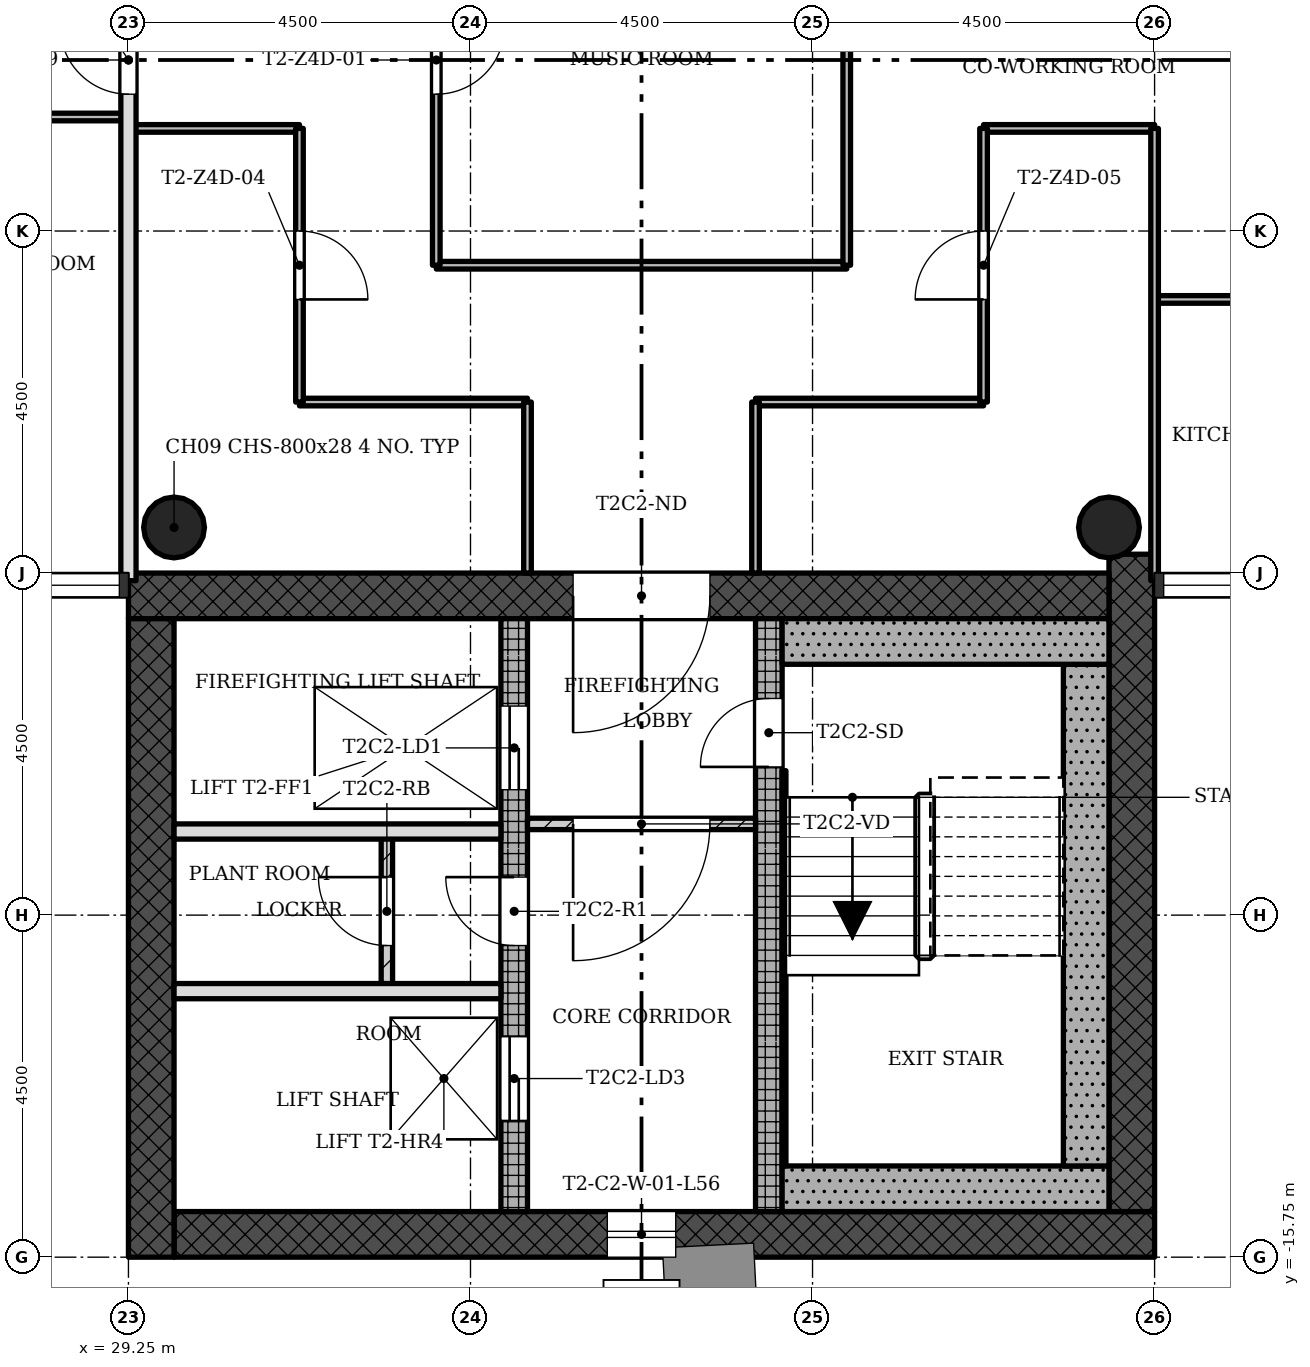
"""IFC4 building model, lengths in metres.
Left out: names, types, materials, properties, quantities, classifications, styles, units other than length and angle.
Written with IfcOpenShell. Run it as: python <this file> out.ifc"""

import sys

from ifc_helpers import new_model, si_unit, direction, frame, frame_2d, origin, origin_2d, place, context, subcontext, project, spatial, rectangle, hollow_circle, extrude, element, fill, save


model = new_model("IFC4")
c1 = context("Model", 3, precision=1e-05, world=origin(), true_north=direction((0.0, 1.0)))
c2 = subcontext(c1, "Body", "Model", "MODEL_VIEW")
j1 = project(units=[si_unit("LENGTHUNIT", "METRE"), si_unit("PLANEANGLEUNIT", "RADIAN")], contexts=[c1])
p1 = place(None, origin())
s1 = spatial("IfcSite", under=j1, at=p1, CompositionType="ELEMENT")
p2 = place(p1, origin())
s2 = spatial("IfcBuilding", under=s1, at=p2, CompositionType="ELEMENT")
p3 = place(p2, frame((0.0, 0.0, 202.8)))
s3 = spatial("IfcBuildingStorey", under=s2, at=p3, CompositionType="ELEMENT", Elevation=202.8)
p4 = place(p3, frame((29.85, -15.45, 0.0), z_axis=(0.0, 0.0, 1.0), x_axis=(1.0, 0.0, 0.0)))
e1 = element("IfcWall", 1, at=p4, inside=s3, PredefinedType="SHEAR", context=c2, shape_type="SweptSolid", body=[
    extrude(rectangle(XDim=12.9, YDim=0.6, at=frame_2d((6.45, 0.0))), origin(), (0.0, 0.0, 1.0), 3.4),
])
p5 = place(p4, frame((5.7, 0.0, 0.45)))
e2 = element("IfcOpeningElement", 2, at=p5, cuts=e1, PredefinedType="OPENING", context=c2, shape_type="SweptSolid", body=[
    extrude(rectangle(XDim=0.9, YDim=2.4, at=frame_2d((0.45, 1.2))), frame((0.0, 0.31, 0.0), z_axis=(0.0, -1.0, 0.0), x_axis=(1.0, 0.0, 0.0)), (0.0, 0.0, 1.0), 0.62),
])
p6 = place(p3, frame((42.45, -15.15, 0.0), z_axis=(0.0, 0.0, 1.0), x_axis=(0.0, 1.0, 0.0)))
e3 = element("IfcWall", 3, at=p6, inside=s3, PredefinedType="SHEAR", context=c2, shape_type="SweptSolid", body=[
    extrude(rectangle(XDim=8.648, YDim=0.6, at=frame_2d((4.324, 0.0))), origin(), (0.0, 0.0, 1.0), 3.4),
])
p7 = place(p3, frame((42.15, -7.05, 0.0), z_axis=(0.0, 0.0, 1.0), x_axis=(-1.0, 0.0, 0.0)))
e4 = element("IfcWall", 4, at=p7, inside=s3, PredefinedType="SHEAR", context=c2, shape_type="SweptSolid", body=[
    extrude(rectangle(XDim=12.9, YDim=0.6, at=frame_2d((6.45, 0.0))), origin(), (0.0, 0.0, 1.0), 3.4),
])
p8 = place(p7, frame((5.25, 0.0, 0.0)))
e5 = element("IfcOpeningElement", 5, at=p8, cuts=e4, PredefinedType="OPENING", context=c2, shape_type="SweptSolid", body=[
    extrude(rectangle(XDim=1.8, YDim=2.1, at=frame_2d((0.9, 1.05))), frame((0.0, 0.31, 0.0), z_axis=(0.0, -1.0, 0.0), x_axis=(1.0, 0.0, 0.0)), (0.0, 0.0, 1.0), 0.62),
])
p9 = place(p3, frame((29.55, -7.35, 0.0), z_axis=(0.0, 0.0, 1.0), x_axis=(0.0, -1.0, 0.0)))
e6 = element("IfcWall", 6, at=p9, inside=s3, PredefinedType="SHEAR", context=c2, shape_type="SweptSolid", body=[
    extrude(rectangle(XDim=8.4, YDim=0.6, at=frame_2d((4.2, 0.0))), origin(), (0.0, 0.0, 1.0), 3.4),
])
p10 = place(p3, frame((34.325, -15.15, 0.0), z_axis=(0.0, 0.0, 1.0), x_axis=(0.0, 1.0, 0.0)))
e7 = element("IfcWall", 7, at=p10, inside=s3, PredefinedType="SHEAR", context=c2, shape_type="SweptSolid", body=[
    extrude(rectangle(XDim=7.8, YDim=0.35, at=frame_2d((3.9, 0.0))), origin(), (0.0, 0.0, 1.0), 3.4),
])
p11 = place(p10, frame((5.55, 0.0, 0.0)))
e8 = element("IfcOpeningElement", 8, at=p11, cuts=e7, PredefinedType="OPENING", context=c2, shape_type="SweptSolid", body=[
    extrude(rectangle(XDim=1.1, YDim=2.1, at=frame_2d((0.55, 1.05))), frame((0.0, 0.185, 0.0), z_axis=(0.0, -1.0, 0.0), x_axis=(1.0, 0.0, 0.0)), (0.0, 0.0, 1.0), 0.37),
])
p12 = place(p10, frame((1.2, 0.0, 0.0)))
e9 = element("IfcOpeningElement", 9, at=p12, cuts=e7, PredefinedType="OPENING", context=c2, shape_type="SweptSolid", body=[
    extrude(rectangle(XDim=1.1, YDim=2.1, at=frame_2d((0.55, 1.05))), frame((0.0, 0.185, 0.0), z_axis=(0.0, -1.0, 0.0), x_axis=(1.0, 0.0, 0.0)), (0.0, 0.0, 1.0), 0.37),
])
p13 = place(p10, frame((3.5, 0.0, 0.0)))
e10 = element("IfcOpeningElement", 10, at=p13, cuts=e7, PredefinedType="OPENING", context=c2, shape_type="SweptSolid", body=[
    extrude(rectangle(XDim=0.9, YDim=2.1, at=frame_2d((0.45, 1.05))), frame((0.0, 0.185, 0.0), z_axis=(0.0, -1.0, 0.0), x_axis=(1.0, 0.0, 0.0)), (0.0, 0.0, 1.0), 0.37),
])
p14 = place(p3, frame((37.675, -15.15, 0.0), z_axis=(0.0, 0.0, 1.0), x_axis=(0.0, 1.0, 0.0)))
e11 = element("IfcWall", 11, at=p14, inside=s3, PredefinedType="SHEAR", context=c2, shape_type="SweptSolid", body=[
    extrude(rectangle(XDim=7.8, YDim=0.35, at=frame_2d((3.9, 0.0))), origin(), (0.0, 0.0, 1.0), 3.4),
])
p15 = place(p14, frame((5.85, 0.0, 0.0)))
e12 = element("IfcOpeningElement", 12, at=p15, cuts=e11, PredefinedType="OPENING", context=c2, shape_type="SweptSolid", body=[
    extrude(rectangle(XDim=0.9, YDim=2.1, at=frame_2d((0.45, 1.05))), frame((0.0, 0.185, 0.0), z_axis=(0.0, -1.0, 0.0), x_axis=(1.0, 0.0, 0.0)), (0.0, 0.0, 1.0), 0.37),
])
for number, where, z_axis, x_axis in (
    (13, (42.15, -6.15, 0.0), (0.0, 0.0, 1.0), (1.0, 0.0, 0.0)),
    (14, (29.85, -6.15, 0.0), (0.0, 0.0, 1.0), (1.0, 0.0, 0.0)),
):
    element("IfcColumn", number, at=place(p3, frame(where, z_axis=z_axis, x_axis=x_axis)), inside=s3, PredefinedType="COLUMN", context=c2, shape_type="SweptSolid", body=[
        extrude(hollow_circle(Radius=0.4, WallThickness=0.028, at=origin_2d()), origin(), (0.0, 0.0, 1.0), 3.4),
    ])
p16 = place(p3, frame((34.5, -10.05, 0.0), z_axis=(0.0, 0.0, 1.0), x_axis=(1.0, 0.0, 0.0)))
e15 = element("IfcWall", 15, at=p16, inside=s3, PredefinedType="PARTITIONING", context=c2, shape_type="SweptSolid", body=[
    extrude(rectangle(XDim=3.0, YDim=0.15, at=frame_2d((1.5, 0.0))), origin(), (0.0, 0.0, 1.0), 3.0),
])
p17 = place(p16, frame((0.6, 0.0, 0.0)))
e16 = element("IfcOpeningElement", 16, at=p17, cuts=e15, PredefinedType="OPENING", context=c2, shape_type="SweptSolid", body=[
    extrude(rectangle(XDim=1.8, YDim=2.1, at=frame_2d((0.9, 1.05))), frame((0.0, 0.085, 0.0), z_axis=(0.0, -1.0, 0.0), x_axis=(1.0, 0.0, 0.0)), (0.0, 0.0, 1.0), 0.17),
])
for number, where, z_axis, x_axis in (
    (17, (29.85, -12.25, 0.0), (0.0, 0.0, 1.0), (1.0, 0.0, 0.0)),
    (18, (29.85, -10.15, 0.0), (0.0, 0.0, 1.0), (1.0, 0.0, 0.0)),
):
    element("IfcWall", number, at=place(p3, frame(where, z_axis=z_axis, x_axis=x_axis)), inside=s3, PredefinedType="SOLIDWALL", context=c2, shape_type="SweptSolid", body=[
        extrude(rectangle(XDim=4.3, YDim=0.2, at=frame_2d((2.15, 0.0))), origin(), (0.0, 0.0, 1.0), 3.0),
    ])
p18 = place(p3, frame((32.65, -10.15, 0.0), z_axis=(0.0, 0.0, 1.0), x_axis=(0.0, -1.0, 0.0)))
e19 = element("IfcWall", 19, at=p18, inside=s3, PredefinedType="PARTITIONING", context=c2, shape_type="SweptSolid", body=[
    extrude(rectangle(XDim=2.1, YDim=0.15, at=frame_2d((1.05, 0.0))), origin(), (0.0, 0.0, 1.0), 3.0),
])
p19 = place(p18, frame((0.6, 0.0, 0.0)))
e20 = element("IfcOpeningElement", 20, at=p19, cuts=e19, PredefinedType="OPENING", context=c2, shape_type="SweptSolid", body=[
    extrude(rectangle(XDim=0.9, YDim=2.1, at=frame_2d((0.45, 1.05))), frame((0.0, 0.085, 0.0), z_axis=(0.0, -1.0, 0.0), x_axis=(1.0, 0.0, 0.0)), (0.0, 0.0, 1.0), 0.17),
])
for number, where, z_axis, x_axis in (
    (21, (40.5, -4.5, 0.0), (0.0, 0.0, 1.0), (-1.0, 0.0, 0.0)),
    (22, (34.5, -4.5, 0.0), (0.0, 0.0, 1.0), (-1.0, 0.0, 0.0)),
):
    element("IfcWall", number, at=place(p3, frame(where, z_axis=z_axis, x_axis=x_axis)), inside=s3, PredefinedType="PARTITIONING", context=c2, shape_type="SweptSolid", body=[
        extrude(rectangle(XDim=3.0, YDim=0.1, at=frame_2d((1.5, 0.0))), origin(), (0.0, 0.0, 1.0), 3.0),
    ])
p20 = place(p3, frame((47.25, -3.15, 0.0), z_axis=(0.0, 0.0, 1.0), x_axis=(-1.0, 0.0, 0.0)))
e23 = element("IfcWall", 23, at=p20, inside=s3, PredefinedType="PARTITIONING", context=c2, shape_type="SweptSolid", body=[
    extrude(rectangle(XDim=4.5, YDim=0.1, at=frame_2d((2.25, 0.0))), origin(), (0.0, 0.0, 1.0), 3.0),
])
p21 = place(p20, frame((1.8, 0.0, 0.0)))
e24 = element("IfcOpeningElement", 24, at=p21, cuts=e23, PredefinedType="OPENING", context=c2, shape_type="SweptSolid", body=[
    extrude(rectangle(XDim=0.9, YDim=2.1, at=frame_2d((0.45, 1.05))), frame((0.0, 0.06, 0.0), z_axis=(0.0, -1.0, 0.0), x_axis=(1.0, 0.0, 0.0)), (0.0, 0.0, 1.0), 0.12),
])
p22 = place(p3, frame((38.7, -2.7, 0.0), z_axis=(0.0, 0.0, 1.0), x_axis=(-1.0, 0.0, 0.0)))
e25 = element("IfcWall", 25, at=p22, inside=s3, PredefinedType="PARTITIONING", context=c2, shape_type="SweptSolid", body=[
    extrude(rectangle(XDim=5.4, YDim=0.1, at=frame_2d((2.7, 0.0))), origin(), (0.0, 0.0, 1.0), 3.0),
])
for number, where, z_axis, x_axis in (
    (26, (42.75, -0.9, 0.0), (0.0, 0.0, 1.0), (-1.0, 0.0, 0.0)),
    (27, (31.5, -0.9, 0.0), (0.0, 0.0, 1.0), (-1.0, 0.0, 0.0)),
):
    element("IfcWall", number, at=place(p3, frame(where, z_axis=z_axis, x_axis=x_axis)), inside=s3, PredefinedType="PARTITIONING", context=c2, shape_type="SweptSolid", body=[
        extrude(rectangle(XDim=2.25, YDim=0.1, at=frame_2d((1.125, 0.0))), origin(), (0.0, 0.0, 1.0), 3.0),
    ])
p23 = place(p3, frame((29.25, -0.75, 0.0), z_axis=(0.0, 0.0, 1.0), x_axis=(-1.0, 0.0, 0.0)))
e28 = element("IfcWall", 28, at=p23, inside=s3, PredefinedType="PARTITIONING", context=c2, shape_type="SweptSolid", body=[
    extrude(rectangle(XDim=4.5, YDim=0.1, at=frame_2d((2.25, 0.0))), origin(), (0.0, 0.0, 1.0), 3.0),
])
p24 = place(p23, frame((1.8, 0.0, 0.0)))
e29 = element("IfcOpeningElement", 29, at=p24, cuts=e28, PredefinedType="OPENING", context=c2, shape_type="SweptSolid", body=[
    extrude(rectangle(XDim=0.9, YDim=2.1, at=frame_2d((0.45, 1.05))), frame((0.0, 0.06, 0.0), z_axis=(0.0, -1.0, 0.0), x_axis=(1.0, 0.0, 0.0)), (0.0, 0.0, 1.0), 0.12),
])
p25 = place(p3, frame((42.75, -6.85, 0.0), z_axis=(0.0, 0.0, 1.0), x_axis=(0.0, 1.0, 0.0)))
e30 = element("IfcWall", 30, at=p25, inside=s3, PredefinedType="PARTITIONING", context=c2, shape_type="SweptSolid", body=[
    extrude(rectangle(XDim=5.95, YDim=0.1, at=frame_2d((2.975, 0.0))), origin(), (0.0, 0.0, 1.0), 3.0),
])
p26 = place(p3, frame((40.5, -4.5, 0.0), z_axis=(0.0, 0.0, 1.0), x_axis=(0.0, 1.0, 0.0)))
e31 = element("IfcWall", 31, at=p26, inside=s3, PredefinedType="PARTITIONING", context=c2, shape_type="SweptSolid", body=[
    extrude(rectangle(XDim=3.6, YDim=0.1, at=frame_2d((1.8, 0.0))), origin(), (0.0, 0.0, 1.0), 3.0),
])
p27 = place(p26, frame((1.35, 0.0, 0.0)))
e32 = element("IfcOpeningElement", 32, at=p27, cuts=e31, PredefinedType="OPENING", context=c2, shape_type="SweptSolid", body=[
    extrude(rectangle(XDim=0.9, YDim=2.1, at=frame_2d((0.45, 1.05))), frame((0.0, 0.06, 0.0), z_axis=(0.0, -1.0, 0.0), x_axis=(1.0, 0.0, 0.0)), (0.0, 0.0, 1.0), 0.12),
])
p28 = place(p3, frame((38.7, -2.7, 0.0), z_axis=(0.0, 0.0, 1.0), x_axis=(0.0, 1.0, 0.0)))
e33 = element("IfcWall", 33, at=p28, inside=s3, PredefinedType="PARTITIONING", context=c2, shape_type="SweptSolid", body=[
    extrude(rectangle(XDim=5.4, YDim=0.1, at=frame_2d((2.7, 0.0))), origin(), (0.0, 0.0, 1.0), 3.0),
])
for number, where, z_axis, x_axis in (
    (34, (37.5, -6.75, 0.0), (0.0, 0.0, 1.0), (0.0, 1.0, 0.0)),
    (35, (34.5, -6.75, 0.0), (0.0, 0.0, 1.0), (0.0, 1.0, 0.0)),
):
    element("IfcWall", number, at=place(p3, frame(where, z_axis=z_axis, x_axis=x_axis)), inside=s3, PredefinedType="PARTITIONING", context=c2, shape_type="SweptSolid", body=[
        extrude(rectangle(XDim=2.25, YDim=0.1, at=frame_2d((1.125, 0.0))), origin(), (0.0, 0.0, 1.0), 3.0),
    ])
p29 = place(p3, frame((33.3, -2.7, 0.0), z_axis=(0.0, 0.0, 1.0), x_axis=(0.0, 1.0, 0.0)))
e36 = element("IfcWall", 36, at=p29, inside=s3, PredefinedType="PARTITIONING", context=c2, shape_type="SweptSolid", body=[
    extrude(rectangle(XDim=5.4, YDim=0.1, at=frame_2d((2.7, 0.0))), origin(), (0.0, 0.0, 1.0), 3.0),
])
p30 = place(p29, frame((2.25, 0.0, 0.0)))
e37 = element("IfcOpeningElement", 37, at=p30, cuts=e36, PredefinedType="OPENING", context=c2, shape_type="SweptSolid", body=[
    extrude(rectangle(XDim=0.9, YDim=2.1, at=frame_2d((0.45, 1.05))), frame((0.0, 0.06, 0.0), z_axis=(0.0, -1.0, 0.0), x_axis=(1.0, 0.0, 0.0)), (0.0, 0.0, 1.0), 0.12),
])
p31 = place(p3, frame((31.5, -4.5, 0.0), z_axis=(0.0, 0.0, 1.0), x_axis=(0.0, 1.0, 0.0)))
e38 = element("IfcWall", 38, at=p31, inside=s3, PredefinedType="PARTITIONING", context=c2, shape_type="SweptSolid", body=[
    extrude(rectangle(XDim=3.6, YDim=0.1, at=frame_2d((1.8, 0.0))), origin(), (0.0, 0.0, 1.0), 3.0),
])
p32 = place(p31, frame((1.35, 0.0, 0.0)))
e39 = element("IfcOpeningElement", 39, at=p32, cuts=e38, PredefinedType="OPENING", context=c2, shape_type="SweptSolid", body=[
    extrude(rectangle(XDim=0.9, YDim=2.1, at=frame_2d((0.45, 1.05))), frame((0.0, 0.06, 0.0), z_axis=(0.0, -1.0, 0.0), x_axis=(1.0, 0.0, 0.0)), (0.0, 0.0, 1.0), 0.12),
])
p33 = place(p3, frame((29.25, -6.85, 0.0), z_axis=(0.0, 0.0, 1.0), x_axis=(0.0, 1.0, 0.0)))
e40 = element("IfcWall", 40, at=p33, inside=s3, PredefinedType="SOLIDWALL", context=c2, shape_type="SweptSolid", body=[
    extrude(rectangle(XDim=13.7, YDim=0.2, at=frame_2d((6.85, 0.0))), origin(), (0.0, 0.0, 1.0), 3.0),
])
p34 = place(p33, frame((6.4, 0.0, 0.0)))
e41 = element("IfcOpeningElement", 41, at=p34, cuts=e40, PredefinedType="OPENING", context=c2, shape_type="SweptSolid", body=[
    extrude(rectangle(XDim=0.9, YDim=2.1, at=frame_2d((0.45, 1.05))), frame((0.0, 0.11, 0.0), z_axis=(0.0, -1.0, 0.0), x_axis=(1.0, 0.0, 0.0)), (0.0, 0.0, 1.0), 0.22),
])
p35 = place(p3, frame((37.85, -14.85, 0.0), z_axis=(0.0, 0.0, 1.0), x_axis=(1.0, 0.0, 0.0)))
e42 = element("IfcWall", 42, at=p35, inside=s3, PredefinedType="SHEAR", context=c2, shape_type="SweptSolid", body=[
    extrude(rectangle(XDim=4.3, YDim=0.6, at=frame_2d((2.15, 0.0))), origin(), (0.0, 0.0, 1.0), 3.4),
])
p36 = place(p3, frame((41.85, -7.95, 0.0), z_axis=(0.0, 0.0, 1.0), x_axis=(0.0, -1.0, 0.0)))
e43 = element("IfcWall", 43, at=p36, inside=s3, PredefinedType="SHEAR", context=c2, shape_type="SweptSolid", body=[
    extrude(rectangle(XDim=6.6, YDim=0.6, at=frame_2d((3.3, 0.0))), origin(), (0.0, 0.0, 1.0), 3.4),
])
p37 = place(p3, frame((37.85, -7.65, 0.0), z_axis=(0.0, 0.0, 1.0), x_axis=(1.0, 0.0, 0.0)))
e44 = element("IfcWall", 44, at=p37, inside=s3, PredefinedType="SHEAR", context=c2, shape_type="SweptSolid", body=[
    extrude(rectangle(XDim=4.3, YDim=0.6, at=frame_2d((2.15, 0.0))), origin(), (0.0, 0.0, 1.0), 3.4),
])
p38 = place(p3, frame((37.875, -9.35, 0.0), z_axis=(0.0, 0.0, 1.0), x_axis=(0.0, -1.0, 0.0)))
e45 = element("IfcWall", 45, at=p38, inside=s3, PredefinedType="SHEAR", context=c2, shape_type="SweptSolid", body=[
    extrude(rectangle(XDim=5.2, YDim=0.05, at=frame_2d((2.6, 0.0))), origin(), (0.0, 0.0, 1.0), 3.4),
])
p39 = place(p5, origin())
e46 = element("IfcWindow", 46, at=p39, inside=s3, PartitioningType="SINGLE_PANEL", PredefinedType="WINDOW", context=c2, shape_type="SweptSolid", body=[
    extrude(rectangle(XDim=0.9, YDim=2.4, at=frame_2d((0.45, 1.2))), frame((0.0, 0.03, 0.0), z_axis=(0.0, -1.0, 0.0), x_axis=(1.0, 0.0, 0.0)), (0.0, 0.0, 1.0), 0.06),
])
fill(e2, e46)
p40 = place(p17, origin())
e47 = element("IfcDoor", 47, at=p40, inside=s3, OperationType="SINGLE_SWING_LEFT", PredefinedType="DOOR", context=c2, shape_type="SweptSolid", body=[
    extrude(rectangle(XDim=1.8, YDim=2.1, at=frame_2d((0.9, 1.05))), frame((0.0, 0.025, 0.0), z_axis=(0.0, -1.0, 0.0), x_axis=(1.0, 0.0, 0.0)), (0.0, 0.0, 1.0), 0.05),
])
fill(e16, e47)
p41 = place(p19, origin())
e48 = element("IfcDoor", 48, at=p41, inside=s3, OperationType="SINGLE_SWING_LEFT", PredefinedType="DOOR", context=c2, shape_type="SweptSolid", body=[
    extrude(rectangle(XDim=0.9, YDim=2.1, at=frame_2d((0.45, 1.05))), frame((0.0, 0.025, 0.0), z_axis=(0.0, -1.0, 0.0), x_axis=(1.0, 0.0, 0.0)), (0.0, 0.0, 1.0), 0.05),
])
fill(e20, e48)
p42 = place(p30, origin())
e49 = element("IfcDoor", 49, at=p42, inside=s3, OperationType="SINGLE_SWING_RIGHT", PredefinedType="DOOR", context=c2, shape_type="SweptSolid", body=[
    extrude(rectangle(XDim=0.9, YDim=2.1, at=frame_2d((0.45, 1.05))), frame((0.0, 0.025, 0.0), z_axis=(0.0, -1.0, 0.0), x_axis=(1.0, 0.0, 0.0)), (0.0, 0.0, 1.0), 0.05),
])
fill(e37, e49)
p43 = place(p32, origin())
e50 = element("IfcDoor", 50, at=p43, inside=s3, OperationType="SINGLE_SWING_LEFT", PredefinedType="DOOR", context=c2, shape_type="SweptSolid", body=[
    extrude(rectangle(XDim=0.9, YDim=2.1, at=frame_2d((0.45, 1.05))), frame((0.0, 0.025, 0.0), z_axis=(0.0, -1.0, 0.0), x_axis=(1.0, 0.0, 0.0)), (0.0, 0.0, 1.0), 0.05),
])
fill(e39, e50)
p44 = place(p27, origin())
e51 = element("IfcDoor", 51, at=p44, inside=s3, OperationType="SINGLE_SWING_RIGHT", PredefinedType="DOOR", context=c2, shape_type="SweptSolid", body=[
    extrude(rectangle(XDim=0.9, YDim=2.1, at=frame_2d((0.45, 1.05))), frame((0.0, 0.025, 0.0), z_axis=(0.0, -1.0, 0.0), x_axis=(1.0, 0.0, 0.0)), (0.0, 0.0, 1.0), 0.05),
])
fill(e32, e51)
p45 = place(p34, origin())
e52 = element("IfcDoor", 52, at=p45, inside=s3, OperationType="SINGLE_SWING_LEFT", PredefinedType="DOOR", context=c2, shape_type="SweptSolid", body=[
    extrude(rectangle(XDim=0.9, YDim=2.1, at=frame_2d((0.45, 1.05))), frame((0.0, 0.025, 0.0), z_axis=(0.0, -1.0, 0.0), x_axis=(1.0, 0.0, 0.0)), (0.0, 0.0, 1.0), 0.05),
])
fill(e41, e52)
p46 = place(p15, origin())
e53 = element("IfcDoor", 53, at=p46, inside=s3, OperationType="SINGLE_SWING_RIGHT", PredefinedType="DOOR", context=c2, shape_type="SweptSolid", body=[
    extrude(rectangle(XDim=0.9, YDim=2.1, at=frame_2d((0.45, 1.05))), frame((0.0, 0.025, 0.0), z_axis=(0.0, -1.0, 0.0), x_axis=(1.0, 0.0, 0.0)), (0.0, 0.0, 1.0), 0.05),
])
fill(e12, e53)
p47 = place(p11, origin())
e54 = element("IfcDoor", 54, at=p47, inside=s3, OperationType="SLIDING_TO_LEFT", PredefinedType="DOOR", context=c2, shape_type="SweptSolid", body=[
    extrude(rectangle(XDim=1.1, YDim=2.1, at=frame_2d((0.55, 1.05))), frame((0.0, 0.025, 0.0), z_axis=(0.0, -1.0, 0.0), x_axis=(1.0, 0.0, 0.0)), (0.0, 0.0, 1.0), 0.05),
])
fill(e8, e54)
p48 = place(p12, origin())
e55 = element("IfcDoor", 55, at=p48, inside=s3, OperationType="SLIDING_TO_LEFT", PredefinedType="DOOR", context=c2, shape_type="SweptSolid", body=[
    extrude(rectangle(XDim=1.1, YDim=2.1, at=frame_2d((0.55, 1.05))), frame((0.0, 0.025, 0.0), z_axis=(0.0, -1.0, 0.0), x_axis=(1.0, 0.0, 0.0)), (0.0, 0.0, 1.0), 0.05),
])
fill(e9, e55)
p49 = place(p13, origin())
e56 = element("IfcDoor", 56, at=p49, inside=s3, OperationType="SINGLE_SWING_LEFT", PredefinedType="DOOR", context=c2, shape_type="SweptSolid", body=[
    extrude(rectangle(XDim=0.9, YDim=2.1, at=frame_2d((0.45, 1.05))), frame((0.0, 0.025, 0.0), z_axis=(0.0, -1.0, 0.0), x_axis=(1.0, 0.0, 0.0)), (0.0, 0.0, 1.0), 0.05),
])
fill(e10, e56)
p50 = place(p8, origin())
e57 = element("IfcDoor", 57, at=p50, inside=s3, OperationType="SINGLE_SWING_LEFT", PredefinedType="DOOR", context=c2, shape_type="SweptSolid", body=[
    extrude(rectangle(XDim=1.8, YDim=2.1, at=frame_2d((0.9, 1.05))), frame((0.0, 0.025, 0.0), z_axis=(0.0, -1.0, 0.0), x_axis=(1.0, 0.0, 0.0)), (0.0, 0.0, 1.0), 0.05),
])
fill(e5, e57)
save(model, sys.argv[1])
